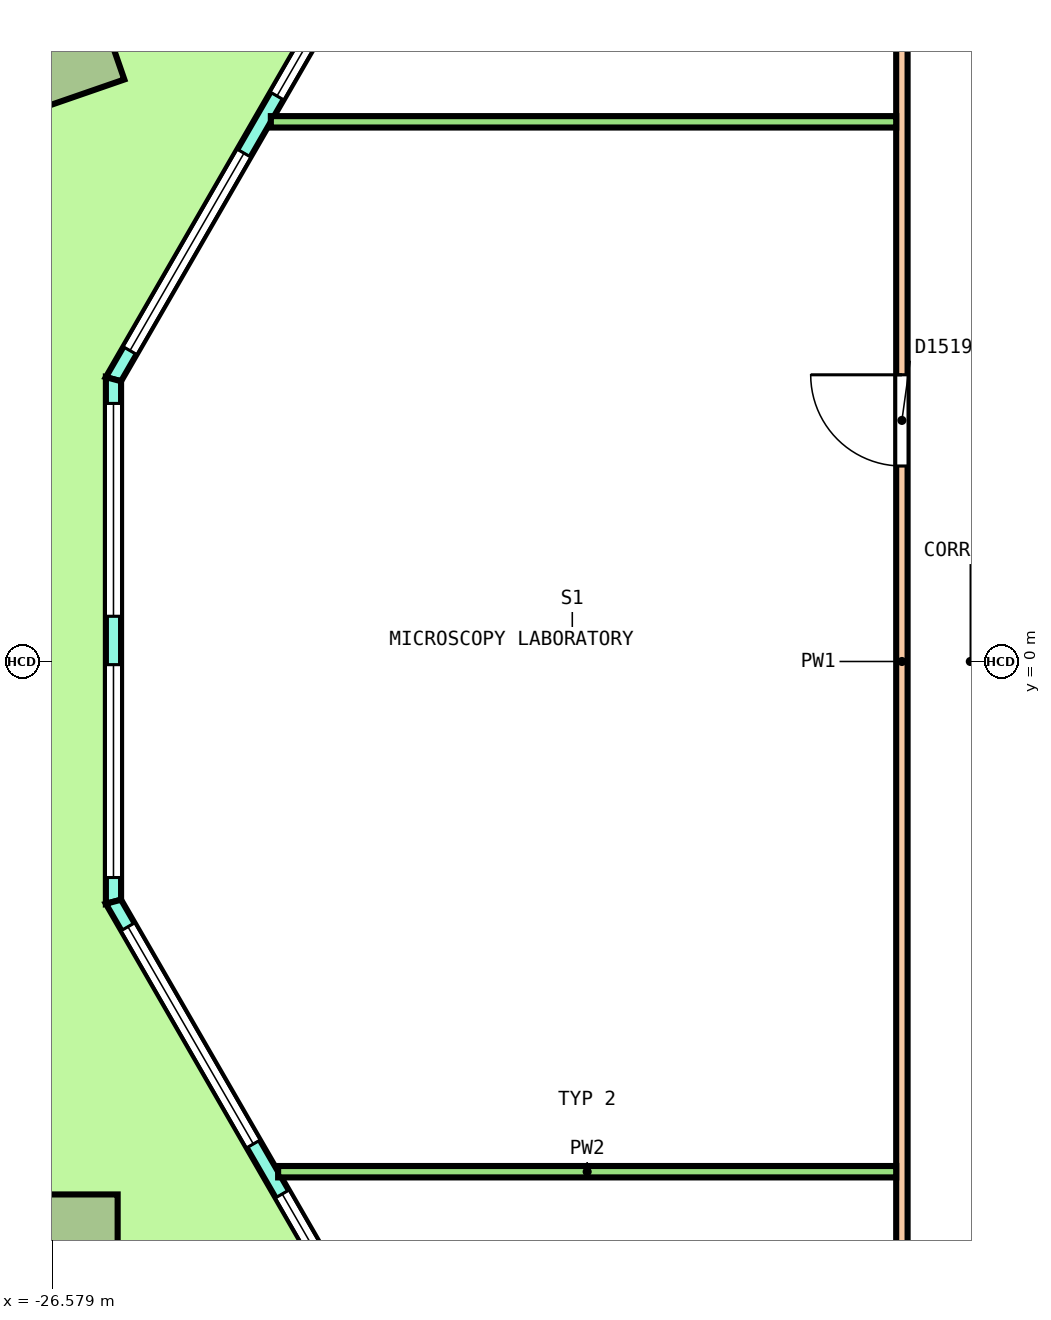
"""IFC4 building model, lengths in metres.
Left out: names, types, materials, properties, quantities, classifications, styles, units other than length and angle.
Written with IfcOpenShell. Run it as: python <this file> out.ifc"""

import sys

from ifc_helpers import new_model, si_unit, direction, frame, frame_2d, origin, origin_2d, place, context, subcontext, project, spatial, polyline, rectangle, outline, extrude, element, fill, save


model = new_model("IFC4")
c1 = context("Model", 3, precision=1e-05, world=origin(), true_north=direction((0.0, 1.0)))
c2 = subcontext(c1, "Body", "Model", "MODEL_VIEW")
j1 = project(units=[si_unit("LENGTHUNIT", "METRE"), si_unit("PLANEANGLEUNIT", "RADIAN")], contexts=[c1])
p1 = place(None, origin())
s1 = spatial("IfcSite", under=j1, at=p1, CompositionType="ELEMENT")
p2 = place(p1, origin())
s2 = spatial("IfcBuilding", under=s1, at=p2, CompositionType="ELEMENT")
p3 = place(p2, frame((0.0, 0.0, 89.6)))
s3 = spatial("IfcBuildingStorey", under=s2, at=p3, CompositionType="ELEMENT", Elevation=89.6)
p4 = place(p3, frame((-26.488, 8.074, 0.0), z_axis=(-0.021810922545, 0.025124736744, 0.999446362373), x_axis=(-0.499316971817, -0.866351047288, 0.010882303046)))
e1 = element("IfcColumn", 1, at=p4, inside=s3, PredefinedType="COLUMN", context=c2, shape_type="SweptSolid", body=[
    extrude(rectangle(XDim=1.35, YDim=1.35, at=origin_2d()), origin(), (0.0, 0.0, 1.0), 4.052),
])
p5 = place(p3, frame((-26.393, -7.687, 0.0), z_axis=(-0.010908911174, 0.018864581201, 0.999762533421), x_axis=(0.500638363085, -0.865382200335, 0.021791667014)))
e2 = element("IfcColumn", 2, at=p5, inside=s3, PredefinedType="COLUMN", context=c2, shape_type="SweptSolid", body=[
    extrude(rectangle(XDim=1.35, YDim=1.35, at=origin_2d()), origin(), (0.0, 0.0, 1.0), 4.051),
])
p6 = place(p3, frame((-16.103, 20.463, 0.0), z_axis=(0.0, 0.0, 1.0), x_axis=(-0.500000373815, -0.866025187962, 0.0)))
e3 = element("IfcWall", 3, at=p6, inside=s3, PredefinedType="SOLIDWALL", context=c2, shape_type="SweptSolid", body=[
    extrude(outline(polyline([(-0.027, -0.1), (0.994, -0.1), (2.015, -0.1), (3.035, -0.1), (4.056, -0.1), (5.077, -0.1), (6.097, -0.1), (7.118, -0.1), (8.139, -0.1), (9.16, -0.1), (10.18, -0.1), (11.201, -0.1), (12.222, -0.1), (13.242, -0.1), (14.263, -0.1), (15.284, -0.1), (16.304, -0.1), (17.325, -0.1), (18.346, -0.1), (19.367, -0.1), (19.313, 0.1), (18.298, 0.1), (17.283, 0.1), (16.268, 0.1), (15.253, 0.1), (14.238, 0.1), (13.223, 0.1), (12.208, 0.1), (11.193, 0.1), (10.177, 0.1), (9.162, 0.1), (8.147, 0.1), (7.132, 0.1), (6.117, 0.1), (5.102, 0.1), (4.087, 0.1), (3.072, 0.1), (2.057, 0.1), (1.042, 0.1), (0.027, 0.1), (-0.027, -0.1)])), origin(), (0.0, 0.0, 1.0), 4.1),
])
p7 = place(p6, frame((0.434, 0.0, 0.1)))
e4 = element("IfcOpeningElement", 4, at=p7, cuts=e3, PredefinedType="OPENING", context=c2, shape_type="SweptSolid", body=[
    extrude(rectangle(XDim=3.0, YDim=2.9, at=frame_2d((1.5, 1.45))), frame((0.0, 0.11, 0.0), z_axis=(0.0, -1.0, 0.0), x_axis=(1.0, 0.0, 0.0)), (0.0, 0.0, 1.0), 0.22),
])
p8 = place(p6, frame((4.302, 0.0, 0.1)))
e5 = element("IfcOpeningElement", 5, at=p8, cuts=e3, PredefinedType="OPENING", context=c2, shape_type="SweptSolid", body=[
    extrude(rectangle(XDim=3.0, YDim=2.9, at=frame_2d((1.5, 1.45))), frame((0.0, 0.11, 0.0), z_axis=(0.0, -1.0, 0.0), x_axis=(1.0, 0.0, 0.0)), (0.0, 0.0, 1.0), 0.22),
])
p9 = place(p6, frame((8.77, 0.0, 0.0)))
e6 = element("IfcOpeningElement", 6, at=p9, cuts=e3, PredefinedType="OPENING", context=c2, shape_type="SweptSolid", body=[
    extrude(rectangle(XDim=1.8, YDim=2.4, at=frame_2d((0.9, 1.2))), frame((0.0, 0.11, 0.0), z_axis=(0.0, -1.0, 0.0), x_axis=(1.0, 0.0, 0.0)), (0.0, 0.0, 1.0), 0.22),
])
p10 = place(p6, frame((8.77, 0.0, 2.55)))
e7 = element("IfcOpeningElement", 7, at=p10, cuts=e3, PredefinedType="OPENING", context=c2, shape_type="SweptSolid", body=[
    extrude(rectangle(XDim=1.8, YDim=0.45, at=frame_2d((0.9, 0.225))), frame((0.0, 0.11, 0.0), z_axis=(0.0, -1.0, 0.0), x_axis=(1.0, 0.0, 0.0)), (0.0, 0.0, 1.0), 0.22),
])
p11 = place(p6, frame((12.038, 0.0, 0.1)))
e8 = element("IfcOpeningElement", 8, at=p11, cuts=e3, PredefinedType="OPENING", context=c2, shape_type="SweptSolid", body=[
    extrude(rectangle(XDim=3.0, YDim=2.9, at=frame_2d((1.5, 1.45))), frame((0.0, 0.11, 0.0), z_axis=(0.0, -1.0, 0.0), x_axis=(1.0, 0.0, 0.0)), (0.0, 0.0, 1.0), 0.22),
])
p12 = place(p6, frame((15.906, 0.0, 0.1)))
e9 = element("IfcOpeningElement", 9, at=p12, cuts=e3, PredefinedType="OPENING", context=c2, shape_type="SweptSolid", body=[
    extrude(rectangle(XDim=3.0, YDim=2.9, at=frame_2d((1.5, 1.45))), frame((0.0, 0.11, 0.0), z_axis=(0.0, -1.0, 0.0), x_axis=(1.0, 0.0, 0.0)), (0.0, 0.0, 1.0), 0.22),
])
p13 = place(p3, frame((-25.772, 3.714, 0.0), z_axis=(0.0, 0.0, 1.0), x_axis=(0.0, -1.0, 0.0)))
e10 = element("IfcWall", 10, at=p13, inside=s3, PredefinedType="SOLIDWALL", context=c2, shape_type="SweptSolid", body=[
    extrude(outline(polyline([(-0.027, -0.1), (1.128, -0.1), (2.283, -0.1), (3.438, -0.1), (4.592, -0.1), (5.747, -0.1), (6.902, -0.1), (6.848, 0.1), (5.711, 0.1), (4.574, 0.1), (3.438, 0.1), (2.301, 0.1), (1.164, 0.1), (0.027, 0.1), (-0.027, -0.1)])), origin(), (0.0, 0.0, 1.0), 4.1),
])
p14 = place(p13, frame((0.319, 0.0, 0.1)))
e11 = element("IfcOpeningElement", 11, at=p14, cuts=e10, PredefinedType="OPENING", context=c2, shape_type="SweptSolid", body=[
    extrude(rectangle(XDim=2.8, YDim=2.9, at=frame_2d((1.4, 1.45))), frame((0.0, 0.11, 0.0), z_axis=(0.0, -1.0, 0.0), x_axis=(1.0, 0.0, 0.0)), (0.0, 0.0, 1.0), 0.22),
])
p15 = place(p13, frame((3.756, 0.0, 0.1)))
e12 = element("IfcOpeningElement", 12, at=p15, cuts=e10, PredefinedType="OPENING", context=c2, shape_type="SweptSolid", body=[
    extrude(rectangle(XDim=2.8, YDim=2.9, at=frame_2d((1.4, 1.45))), frame((0.0, 0.11, 0.0), z_axis=(0.0, -1.0, 0.0), x_axis=(1.0, 0.0, 0.0)), (0.0, 0.0, 1.0), 0.22),
])
p16 = place(p3, frame((-25.772, -3.161, 0.0), z_axis=(0.0, 0.0, 1.0), x_axis=(0.500001833672, -0.866024345111, 0.0)))
e13 = element("IfcWall", 13, at=p16, inside=s3, PredefinedType="SOLIDWALL", context=c2, shape_type="SweptSolid", body=[
    extrude(outline(polyline([(-0.027, -0.1), (0.991, -0.1), (2.008, -0.1), (3.026, -0.1), (4.043, -0.1), (5.061, -0.1), (6.079, -0.1), (7.096, -0.1), (8.114, -0.1), (9.131, -0.1), (10.149, -0.1), (11.167, -0.1), (12.184, -0.1), (13.202, -0.1), (14.219, -0.1), (15.237, -0.1), (16.254, -0.1), (17.272, -0.1), (18.29, -0.1), (19.307, -0.1), (20.325, -0.1), (20.271, 0.1), (19.259, 0.1), (18.247, 0.1), (17.234, 0.1), (16.222, 0.1), (15.21, 0.1), (14.198, 0.1), (13.186, 0.1), (12.173, 0.1), (11.161, 0.1), (10.149, 0.1), (9.137, 0.1), (8.125, 0.1), (7.112, 0.1), (6.1, 0.1), (5.088, 0.1), (4.076, 0.1), (3.063, 0.1), (2.051, 0.1), (1.039, 0.1), (0.027, 0.1), (-0.027, -0.1)])), origin(), (0.0, 0.0, 1.0), 4.1),
])
p17 = place(p16, frame((0.38, 0.0, 0.1)))
e14 = element("IfcOpeningElement", 14, at=p17, cuts=e13, PredefinedType="OPENING", context=c2, shape_type="SweptSolid", body=[
    extrude(rectangle(XDim=3.3, YDim=2.9, at=frame_2d((1.65, 1.45))), frame((0.0, 0.11, 0.0), z_axis=(0.0, -1.0, 0.0), x_axis=(1.0, 0.0, 0.0)), (0.0, 0.0, 1.0), 0.22),
])
p18 = place(p16, frame((4.439, 0.0, 0.1)))
e15 = element("IfcOpeningElement", 15, at=p18, cuts=e13, PredefinedType="OPENING", context=c2, shape_type="SweptSolid", body=[
    extrude(rectangle(XDim=3.3, YDim=2.9, at=frame_2d((1.65, 1.45))), frame((0.0, 0.11, 0.0), z_axis=(0.0, -1.0, 0.0), x_axis=(1.0, 0.0, 0.0)), (0.0, 0.0, 1.0), 0.22),
])
p19 = place(p16, frame((9.249, 0.0, 0.0)))
e16 = element("IfcOpeningElement", 16, at=p19, cuts=e13, PredefinedType="OPENING", context=c2, shape_type="SweptSolid", body=[
    extrude(rectangle(XDim=1.8, YDim=2.4, at=frame_2d((0.9, 1.2))), frame((0.0, 0.11, 0.0), z_axis=(0.0, -1.0, 0.0), x_axis=(1.0, 0.0, 0.0)), (0.0, 0.0, 1.0), 0.22),
])
p20 = place(p16, frame((9.249, 0.0, 2.55)))
e17 = element("IfcOpeningElement", 17, at=p20, cuts=e13, PredefinedType="OPENING", context=c2, shape_type="SweptSolid", body=[
    extrude(rectangle(XDim=1.8, YDim=0.45, at=frame_2d((0.9, 0.225))), frame((0.0, 0.11, 0.0), z_axis=(0.0, -1.0, 0.0), x_axis=(1.0, 0.0, 0.0)), (0.0, 0.0, 1.0), 0.22),
])
p21 = place(p16, frame((12.559, 0.0, 0.1)))
e18 = element("IfcOpeningElement", 18, at=p21, cuts=e13, PredefinedType="OPENING", context=c2, shape_type="SweptSolid", body=[
    extrude(rectangle(XDim=3.3, YDim=2.9, at=frame_2d((1.65, 1.45))), frame((0.0, 0.11, 0.0), z_axis=(0.0, -1.0, 0.0), x_axis=(1.0, 0.0, 0.0)), (0.0, 0.0, 1.0), 0.22),
])
p22 = place(p16, frame((16.618, 0.0, 0.1)))
e19 = element("IfcOpeningElement", 19, at=p22, cuts=e13, PredefinedType="OPENING", context=c2, shape_type="SweptSolid", body=[
    extrude(rectangle(XDim=3.3, YDim=2.9, at=frame_2d((1.65, 1.45))), frame((0.0, 0.11, 0.0), z_axis=(0.0, -1.0, 0.0), x_axis=(1.0, 0.0, 0.0)), (0.0, 0.0, 1.0), 0.22),
])
p23 = place(p3, frame((-15.4, -12.925, 0.0), z_axis=(0.0, 0.0, 1.0), x_axis=(0.0, 1.0, 0.0)))
e20 = element("IfcWall", 20, at=p23, inside=s3, PredefinedType="PARTITIONING", context=c2, shape_type="SweptSolid", body=[
    extrude(rectangle(XDim=25.85, YDim=0.15, at=frame_2d((12.925, 0.0))), origin(), (0.0, 0.0, 1.0), 3.05),
])
p24 = place(p23, frame((21.375, 0.0, 0.0)))
e21 = element("IfcOpeningElement", 21, at=p24, cuts=e20, PredefinedType="OPENING", context=c2, shape_type="SweptSolid", body=[
    extrude(rectangle(XDim=1.2, YDim=2.1, at=frame_2d((0.6, 1.05))), frame((0.0, 0.085, 0.0), z_axis=(0.0, -1.0, 0.0), x_axis=(1.0, 0.0, 0.0)), (0.0, 0.0, 1.0), 0.17),
])
p25 = place(p23, frame((15.497, 0.0, 0.0)))
e22 = element("IfcOpeningElement", 22, at=p25, cuts=e20, PredefinedType="OPENING", context=c2, shape_type="SweptSolid", body=[
    extrude(rectangle(XDim=1.2, YDim=2.1, at=frame_2d((0.6, 1.05))), frame((0.0, 0.085, 0.0), z_axis=(0.0, -1.0, 0.0), x_axis=(1.0, 0.0, 0.0)), (0.0, 0.0, 1.0), 0.17),
])
p26 = place(p23, frame((3.566, 0.0, 0.0)))
e23 = element("IfcOpeningElement", 23, at=p26, cuts=e20, PredefinedType="OPENING", context=c2, shape_type="SweptSolid", body=[
    extrude(rectangle(XDim=1.2, YDim=2.1, at=frame_2d((0.6, 1.05))), frame((0.0, 0.085, 0.0), z_axis=(0.0, -1.0, 0.0), x_axis=(1.0, 0.0, 0.0)), (0.0, 0.0, 1.0), 0.17),
])
p27 = place(p3, frame((-23.702, 7.1, 0.0), z_axis=(0.0, 0.0, 1.0), x_axis=(1.0, 0.0, 0.0)))
e24 = element("IfcWall", 24, at=p27, inside=s3, PredefinedType="PARTITIONING", context=c2, shape_type="SweptSolid", body=[
    extrude(rectangle(XDim=8.227, YDim=0.15, at=frame_2d((4.114, 0.0))), origin(), (0.0, 0.0, 1.0), 3.05),
])
p28 = place(p3, frame((-23.606, -6.712, 0.0), z_axis=(0.0, 0.0, 1.0), x_axis=(1.0, 0.0, 0.0)))
e25 = element("IfcWall", 25, at=p28, inside=s3, PredefinedType="PARTITIONING", context=c2, shape_type="SweptSolid", body=[
    extrude(rectangle(XDim=8.131, YDim=0.15, at=frame_2d((4.066, 0.0))), origin(), (0.0, 0.0, 1.0), 3.05),
])
p29 = place(p11, origin())
e26 = element("IfcWindow", 26, at=p29, inside=s3, PartitioningType="SINGLE_PANEL", PredefinedType="WINDOW", context=c2, shape_type="SweptSolid", body=[
    extrude(rectangle(XDim=3.0, YDim=2.9, at=frame_2d((1.5, 1.45))), frame((0.0, 0.03, 0.0), z_axis=(0.0, -1.0, 0.0), x_axis=(1.0, 0.0, 0.0)), (0.0, 0.0, 1.0), 0.06),
])
fill(e8, e26)
p30 = place(p12, origin())
e27 = element("IfcWindow", 27, at=p30, inside=s3, PartitioningType="SINGLE_PANEL", PredefinedType="WINDOW", context=c2, shape_type="SweptSolid", body=[
    extrude(rectangle(XDim=3.0, YDim=2.9, at=frame_2d((1.5, 1.45))), frame((0.0, 0.03, 0.0), z_axis=(0.0, -1.0, 0.0), x_axis=(1.0, 0.0, 0.0)), (0.0, 0.0, 1.0), 0.06),
])
fill(e9, e27)
p31 = place(p14, origin())
e28 = element("IfcWindow", 28, at=p31, inside=s3, PartitioningType="SINGLE_PANEL", PredefinedType="WINDOW", context=c2, shape_type="SweptSolid", body=[
    extrude(rectangle(XDim=2.8, YDim=2.9, at=frame_2d((1.4, 1.45))), frame((0.0, 0.03, 0.0), z_axis=(0.0, -1.0, 0.0), x_axis=(1.0, 0.0, 0.0)), (0.0, 0.0, 1.0), 0.06),
])
fill(e11, e28)
p32 = place(p15, origin())
e29 = element("IfcWindow", 29, at=p32, inside=s3, PartitioningType="SINGLE_PANEL", PredefinedType="WINDOW", context=c2, shape_type="SweptSolid", body=[
    extrude(rectangle(XDim=2.8, YDim=2.9, at=frame_2d((1.4, 1.45))), frame((0.0, 0.03, 0.0), z_axis=(0.0, -1.0, 0.0), x_axis=(1.0, 0.0, 0.0)), (0.0, 0.0, 1.0), 0.06),
])
fill(e12, e29)
p33 = place(p17, origin())
e30 = element("IfcWindow", 30, at=p33, inside=s3, PartitioningType="SINGLE_PANEL", PredefinedType="WINDOW", context=c2, shape_type="SweptSolid", body=[
    extrude(rectangle(XDim=3.3, YDim=2.9, at=frame_2d((1.65, 1.45))), frame((0.0, 0.03, 0.0), z_axis=(0.0, -1.0, 0.0), x_axis=(1.0, 0.0, 0.0)), (0.0, 0.0, 1.0), 0.06),
])
fill(e14, e30)
p34 = place(p18, origin())
e31 = element("IfcWindow", 31, at=p34, inside=s3, PartitioningType="SINGLE_PANEL", PredefinedType="WINDOW", context=c2, shape_type="SweptSolid", body=[
    extrude(rectangle(XDim=3.3, YDim=2.9, at=frame_2d((1.65, 1.45))), frame((0.0, 0.03, 0.0), z_axis=(0.0, -1.0, 0.0), x_axis=(1.0, 0.0, 0.0)), (0.0, 0.0, 1.0), 0.06),
])
fill(e15, e31)
p35 = place(p25, origin())
e32 = element("IfcDoor", 32, at=p35, inside=s3, OperationType="DOUBLE_DOOR_SINGLE_SWING", PredefinedType="DOOR", context=c2, shape_type="SweptSolid", body=[
    extrude(rectangle(XDim=1.2, YDim=2.1, at=frame_2d((0.6, 1.05))), frame((0.0, 0.025, 0.0), z_axis=(0.0, -1.0, 0.0), x_axis=(1.0, 0.0, 0.0)), (0.0, 0.0, 1.0), 0.05),
])
fill(e22, e32)
save(model, sys.argv[1])
